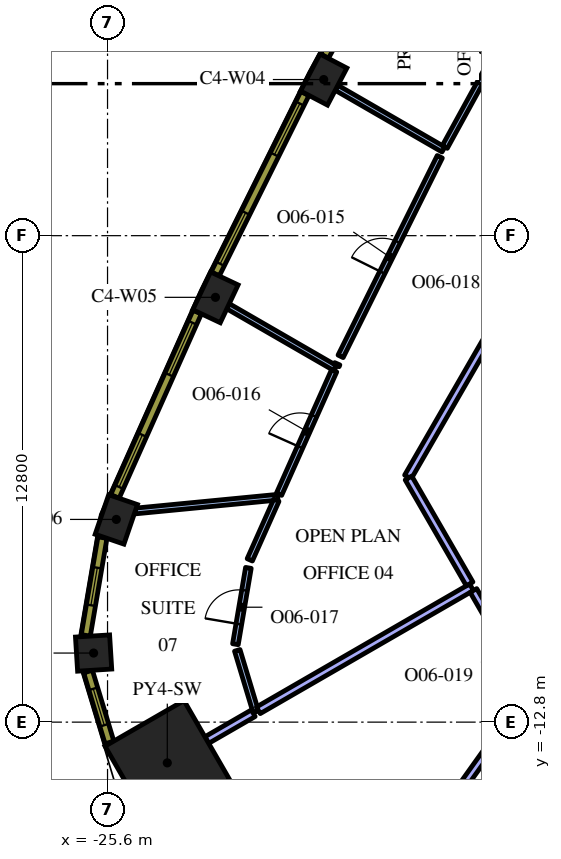
"""IFC4 building model, lengths in metres.
Left out: names, types, materials, properties, quantities, classifications, styles, units other than length and angle.
Written with IfcOpenShell. Run it as: python <this file> out.ifc"""

import sys

from ifc_helpers import new_model, si_unit, direction, frame, frame_2d, origin, origin_2d, place, context, subcontext, project, spatial, rectangle, extrude, element, fill, save


model = new_model("IFC4")
c1 = context("Model", 3, precision=1e-05, world=origin(), true_north=direction((0.0, 1.0)))
c2 = subcontext(c1, "Body", "Model", "MODEL_VIEW")
j1 = project(units=[si_unit("LENGTHUNIT", "METRE"), si_unit("PLANEANGLEUNIT", "RADIAN")], contexts=[c1])
p1 = place(None, origin())
s1 = spatial("IfcSite", under=j1, at=p1, CompositionType="ELEMENT")
p2 = place(p1, origin())
s2 = spatial("IfcBuilding", under=s1, at=p2, CompositionType="ELEMENT")
p3 = place(p2, frame((0.0, 0.0, 210.0)))
s3 = spatial("IfcBuildingStorey", under=s2, at=p3, CompositionType="ELEMENT", Elevation=210.0)
p4 = place(p3, frame((-24.027, -13.872, 0.0), z_axis=(0.0, 0.0, 1.0), x_axis=(-0.866025403784, -0.5, 0.0)))
e1 = element("IfcColumn", 1, at=p4, inside=s3, PredefinedType="COLUMN", context=c2, shape_type="SweptSolid", body=[
    extrude(rectangle(XDim=2.4, YDim=2.4, at=origin_2d()), origin(), (0.0, 0.0, 1.0), 4.2),
])
for number, where, z_axis, x_axis in (
    (2, (-19.912, 4.108, 0.0), (0.0, 0.0, 1.0), (-0.464, -0.886, 0.0)),
    (3, (-22.76, -1.623, 0.0), (0.0, 0.0, 1.0), (-0.426, -0.905, 0.0)),
    (4, (-25.369, -7.466, 0.0), (0.0, 0.0, 1.0), (-0.324, -0.946, 0.0)),
):
    element("IfcColumn", number, at=place(p3, frame(where, z_axis=z_axis, x_axis=x_axis)), inside=s3, PredefinedType="COLUMN", context=c2, shape_type="SweptSolid", body=[
        extrude(rectangle(XDim=1.1, YDim=0.8, at=origin_2d()), origin(), (0.0, 0.0, 1.0), 4.2),
    ])
p5 = place(p3, frame((-25.967, -10.982, 0.0), z_axis=(0.0, 0.0, 1.0), x_axis=(0.062217428964, -0.998062619044, 0.0)))
e5 = element("IfcColumn", 5, at=p5, inside=s3, PredefinedType="COLUMN", context=c2, shape_type="SweptSolid", body=[
    extrude(rectangle(XDim=0.9, YDim=0.9, at=origin_2d()), origin(), (0.0, 0.0, 1.0), 4.2),
])
p6 = place(p3, frame((-18.709, -17.916, 0.0), z_axis=(0.0, 0.0, 1.0), x_axis=(0.581023578026, 0.813886725397, 0.0)))
e6 = element("IfcWall", 6, at=p6, inside=s3, PredefinedType="PARTITIONING", context=c2, shape_type="SweptSolid", body=[
    extrude(rectangle(XDim=7.318, YDim=0.2, at=frame_2d((3.659, 0.0))), origin(), (0.0, 0.0, 1.0), 3.45),
])
p7 = place(p3, frame((-16.761, 2.268, 0.0), z_axis=(0.0, 0.0, 1.0), x_axis=(-0.866022812202, 0.500004488726, 0.0)))
e7 = element("IfcWall", 7, at=p7, inside=s3, PredefinedType="PARTITIONING", context=c2, shape_type="SweptSolid", body=[
    extrude(rectangle(XDim=3.247, YDim=0.15, at=frame_2d((1.624, 0.0))), origin(), (0.0, 0.0, 1.0), 3.45),
])
p8 = place(p3, frame((-16.725, 2.333, 0.0), z_axis=(0.0, 0.0, 1.0), x_axis=(0.480955103875, 0.876745224142, 0.0)))
e8 = element("IfcWall", 8, at=p8, inside=s3, PredefinedType="PARTITIONING", context=c2, shape_type="SweptSolid", body=[
    extrude(rectangle(XDim=6.129, YDim=0.15, at=frame_2d((3.064, 0.0))), origin(), (0.0, 0.0, 1.0), 3.45),
])
p9 = place(p8, frame((2.629, 0.0, 0.0)))
e9 = element("IfcOpeningElement", 9, at=p9, cuts=e8, PredefinedType="OPENING", context=c2, shape_type="SweptSolid", body=[
    extrude(rectangle(XDim=0.9, YDim=2.1, at=frame_2d((0.45, 1.05))), frame((0.0, 0.085, 0.0), z_axis=(0.0, -1.0, 0.0), x_axis=(1.0, 0.0, 0.0)), (0.0, 0.0, 1.0), 0.17),
])
p10 = place(p3, frame((-19.606, -3.487, 0.0), z_axis=(0.0, 0.0, 1.0), x_axis=(-0.866017179828, 0.50001424404, 0.0)))
e10 = element("IfcWall", 10, at=p10, inside=s3, PredefinedType="PARTITIONING", context=c2, shape_type="SweptSolid", body=[
    extrude(rectangle(XDim=3.259, YDim=0.15, at=frame_2d((1.63, 0.0))), origin(), (0.0, 0.0, 1.0), 3.45),
])
p11 = place(p3, frame((-19.467, -3.175, 0.0), z_axis=(0.0, 0.0, 1.0), x_axis=(0.445180755526, 0.895440726631, 0.0)))
e11 = element("IfcWall", 11, at=p11, inside=s3, PredefinedType="PARTITIONING", context=c2, shape_type="SweptSolid", body=[
    extrude(rectangle(XDim=5.864, YDim=0.15, at=frame_2d((2.932, 0.0))), origin(), (0.0, 0.0, 1.0), 3.45),
])
p12 = place(p11, frame((2.464, 0.0, 0.0)))
e12 = element("IfcOpeningElement", 12, at=p12, cuts=e11, PredefinedType="OPENING", context=c2, shape_type="SweptSolid", body=[
    extrude(rectangle(XDim=0.9, YDim=2.1, at=frame_2d((0.45, 1.05))), frame((0.0, 0.085, 0.0), z_axis=(0.0, -1.0, 0.0), x_axis=(1.0, 0.0, 0.0)), (0.0, 0.0, 1.0), 0.17),
])
p13 = place(p3, frame((-19.554, -3.371, 0.0), z_axis=(0.0, 0.0, 1.0), x_axis=(-0.408782924594, -0.912631645605, 0.0)))
e13 = element("IfcWall", 13, at=p13, inside=s3, PredefinedType="PARTITIONING", context=c2, shape_type="SweptSolid", body=[
    extrude(rectangle(XDim=0.051, YDim=0.15, at=frame_2d((0.026, 0.0))), origin(), (0.0, 0.0, 1.0), 3.45),
])
p14 = place(p3, frame((-21.122, -6.882, 0.0), z_axis=(0.0, 0.0, 1.0), x_axis=(-0.995354824533, -0.096274468471, 0.0)))
e14 = element("IfcWall", 14, at=p14, inside=s3, PredefinedType="PARTITIONING", context=c2, shape_type="SweptSolid", body=[
    extrude(rectangle(XDim=3.766, YDim=0.15, at=frame_2d((1.883, 0.0))), origin(), (0.0, 0.0, 1.0), 3.45),
])
p15 = place(p3, frame((-21.087, -6.803, 0.0), z_axis=(0.0, 0.0, 1.0), x_axis=(0.40757725445, 0.913170729741, 0.0)))
e15 = element("IfcWall", 15, at=p15, inside=s3, PredefinedType="PARTITIONING", context=c2, shape_type="SweptSolid", body=[
    extrude(rectangle(XDim=3.557, YDim=0.15, at=frame_2d((1.778, 0.0))), origin(), (0.0, 0.0, 1.0), 3.45),
])
p16 = place(p15, frame((1.357, 0.0, 0.0)))
e16 = element("IfcOpeningElement", 16, at=p16, cuts=e15, PredefinedType="OPENING", context=c2, shape_type="SweptSolid", body=[
    extrude(rectangle(XDim=0.9, YDim=2.1, at=frame_2d((0.45, 1.05))), frame((0.0, 0.085, 0.0), z_axis=(0.0, -1.0, 0.0), x_axis=(1.0, 0.0, 0.0)), (0.0, 0.0, 1.0), 0.17),
])
p17 = place(p3, frame((-21.157, -6.961, 0.0), z_axis=(0.0, 0.0, 1.0), x_axis=(-0.407627569492, -0.913148270869, 0.0)))
e17 = element("IfcWall", 17, at=p17, inside=s3, PredefinedType="PARTITIONING", context=c2, shape_type="SweptSolid", body=[
    extrude(rectangle(XDim=1.718, YDim=0.15, at=frame_2d((0.859, 0.0))), origin(), (0.0, 0.0, 1.0), 3.45),
])
p18 = place(p3, frame((-22.235, -10.75, 0.0), z_axis=(0.0, 0.0, 1.0), x_axis=(0.167623442148, 0.985851095066, 0.0)))
e18 = element("IfcWall", 18, at=p18, inside=s3, PredefinedType="PARTITIONING", context=c2, shape_type="SweptSolid", body=[
    extrude(rectangle(XDim=2.038, YDim=0.15, at=frame_2d((1.019, 0.0))), origin(), (0.0, 0.0, 1.0), 3.45),
])
p19 = place(p18, frame((0.538, 0.0, 0.0)))
e19 = element("IfcOpeningElement", 19, at=p19, cuts=e18, PredefinedType="OPENING", context=c2, shape_type="SweptSolid", body=[
    extrude(rectangle(XDim=0.9, YDim=2.1, at=frame_2d((0.45, 1.05))), frame((0.0, 0.085, 0.0), z_axis=(0.0, -1.0, 0.0), x_axis=(1.0, 0.0, 0.0)), (0.0, 0.0, 1.0), 0.17),
])
p20 = place(p3, frame((-22.186, -10.911, 0.0), z_axis=(0.0, 0.0, 1.0), x_axis=(0.288899576463, -0.957359407286, 0.0)))
e20 = element("IfcWall", 20, at=p20, inside=s3, PredefinedType="PARTITIONING", context=c2, shape_type="SweptSolid", body=[
    extrude(rectangle(XDim=1.688, YDim=0.15, at=frame_2d((0.844, 0.0))), origin(), (0.0, 0.0, 1.0), 3.45),
])
p21 = place(p3, frame((-21.765, -12.566, 0.0), z_axis=(0.0, 0.0, 1.0), x_axis=(-0.866021473228, -0.500006807861, 0.0)))
e21 = element("IfcWall", 21, at=p21, inside=s3, PredefinedType="PARTITIONING", context=c2, shape_type="SweptSolid", body=[
    extrude(rectangle(XDim=1.412, YDim=0.2, at=frame_2d((0.706, 0.0))), origin(), (0.0, 0.0, 1.0), 3.45),
])
p22 = place(p3, frame((-16.021, -9.25, 0.0), z_axis=(0.0, 0.0, 1.0), x_axis=(-0.86601739438, -0.500013872438, 0.0)))
e22 = element("IfcWall", 22, at=p22, inside=s3, PredefinedType="PARTITIONING", context=c2, shape_type="SweptSolid", body=[
    extrude(rectangle(XDim=6.478, YDim=0.2, at=frame_2d((3.239, 0.0))), origin(), (0.0, 0.0, 1.0), 3.45),
])
p23 = place(p3, frame((-12.787, 2.152, 0.0), z_axis=(0.0, 0.0, 1.0), x_axis=(-0.50000660679, -0.866021589319, 0.0)))
e23 = element("IfcWall", 23, at=p23, inside=s3, PredefinedType="PARTITIONING", context=c2, shape_type="SweptSolid", body=[
    extrude(rectangle(XDim=9.817, YDim=0.2, at=frame_2d((4.909, 0.0))), origin(), (0.0, 0.0, 1.0), 3.45),
])
p24 = place(p23, frame((4.4, 0.0, 0.0)))
e24 = element("IfcOpeningElement", 24, at=p24, cuts=e23, PredefinedType="OPENING", context=c2, shape_type="SweptSolid", body=[
    extrude(rectangle(XDim=1.0, YDim=2.1, at=frame_2d((0.5, 1.05))), frame((0.0, 0.11, 0.0), z_axis=(0.0, -1.0, 0.0), x_axis=(1.0, 0.0, 0.0)), (0.0, 0.0, 1.0), 0.22),
])
p25 = place(p3, frame((-17.681, -6.376, 0.0), z_axis=(0.0, 0.0, 1.0), x_axis=(0.500022299258, -0.866012528919, 0.0)))
e25 = element("IfcWall", 25, at=p25, inside=s3, PredefinedType="PARTITIONING", context=c2, shape_type="SweptSolid", body=[
    extrude(rectangle(XDim=3.219, YDim=0.2, at=frame_2d((1.609, 0.0))), origin(), (0.0, 0.0, 1.0), 3.45),
])
p26 = place(p3, frame((-15.971, -9.337, 0.0), z_axis=(0.0, 0.0, 1.0), x_axis=(0.500007233661, -0.866021227388, 0.0)))
e26 = element("IfcWall", 26, at=p26, inside=s3, PredefinedType="PARTITIONING", context=c2, shape_type="SweptSolid", body=[
    extrude(rectangle(XDim=2.919, YDim=0.2, at=frame_2d((1.459, 0.0))), origin(), (0.0, 0.0, 1.0), 3.45),
])
p27 = place(p26, frame((1.0, 0.0, 0.0)))
e27 = element("IfcOpeningElement", 27, at=p27, cuts=e26, PredefinedType="OPENING", context=c2, shape_type="SweptSolid", body=[
    extrude(rectangle(XDim=1.0, YDim=2.1, at=frame_2d((0.5, 1.05))), frame((0.0, 0.11, 0.0), z_axis=(0.0, -1.0, 0.0), x_axis=(1.0, 0.0, 0.0)), (0.0, 0.0, 1.0), 0.22),
])
p28 = place(p3, frame((-17.338, 9.368, 0.0), z_axis=(0.0, 0.0, 1.0), x_axis=(-0.481925825015, -0.876212017256, 0.0)))
e28 = element("IfcWall", 28, at=p28, inside=s3, PredefinedType="SOLIDWALL", context=c2, shape_type="SweptSolid", body=[
    extrude(rectangle(XDim=5.299, YDim=0.24, at=frame_2d((2.649, 0.0))), origin(), (0.0, 0.0, 1.0), 3.95),
])
p29 = place(p28, frame((0.295, 0.0, 0.9)))
e29 = element("IfcOpeningElement", 29, at=p29, cuts=e28, PredefinedType="OPENING", context=c2, shape_type="SweptSolid", body=[
    extrude(rectangle(XDim=1.5, YDim=2.55, at=frame_2d((0.75, 1.275))), frame((0.0, 0.13, 0.0), z_axis=(0.0, -1.0, 0.0), x_axis=(1.0, 0.0, 0.0)), (0.0, 0.0, 1.0), 0.26),
])
p30 = place(p28, frame((3.504, 0.0, 0.9)))
e30 = element("IfcOpeningElement", 30, at=p30, cuts=e28, PredefinedType="OPENING", context=c2, shape_type="SweptSolid", body=[
    extrude(rectangle(XDim=1.5, YDim=2.55, at=frame_2d((0.75, 1.275))), frame((0.0, 0.13, 0.0), z_axis=(0.0, -1.0, 0.0), x_axis=(1.0, 0.0, 0.0)), (0.0, 0.0, 1.0), 0.26),
])
p31 = place(p3, frame((-20.407, 3.74, 0.0), z_axis=(0.0, 0.0, 1.0), x_axis=(-0.445129582031, -0.895466166419, 0.0)))
e31 = element("IfcWall", 31, at=p31, inside=s3, PredefinedType="SOLIDWALL", context=c2, shape_type="SweptSolid", body=[
    extrude(rectangle(XDim=5.298, YDim=0.24, at=frame_2d((2.649, 0.0))), origin(), (0.0, 0.0, 1.0), 3.95),
])
p32 = place(p31, frame((0.295, 0.0, 0.9)))
e32 = element("IfcOpeningElement", 32, at=p32, cuts=e31, PredefinedType="OPENING", context=c2, shape_type="SweptSolid", body=[
    extrude(rectangle(XDim=1.5, YDim=2.55, at=frame_2d((0.75, 1.275))), frame((0.0, 0.13, 0.0), z_axis=(0.0, -1.0, 0.0), x_axis=(1.0, 0.0, 0.0)), (0.0, 0.0, 1.0), 0.26),
])
p33 = place(p31, frame((3.504, 0.0, 0.9)))
e33 = element("IfcOpeningElement", 33, at=p33, cuts=e31, PredefinedType="OPENING", context=c2, shape_type="SweptSolid", body=[
    extrude(rectangle(XDim=1.5, YDim=2.55, at=frame_2d((0.75, 1.275))), frame((0.0, 0.13, 0.0), z_axis=(0.0, -1.0, 0.0), x_axis=(1.0, 0.0, 0.0)), (0.0, 0.0, 1.0), 0.26),
])
p34 = place(p3, frame((-23.24, -2.011, 0.0), z_axis=(0.0, 0.0, 1.0), x_axis=(-0.407579651789, -0.913169659728, 0.0)))
e34 = element("IfcWall", 34, at=p34, inside=s3, PredefinedType="SOLIDWALL", context=c2, shape_type="SweptSolid", body=[
    extrude(rectangle(XDim=5.311, YDim=0.24, at=frame_2d((2.655, 0.0))), origin(), (0.0, 0.0, 1.0), 3.95),
])
p35 = place(p34, frame((0.306, 0.0, 0.9)))
e35 = element("IfcOpeningElement", 35, at=p35, cuts=e34, PredefinedType="OPENING", context=c2, shape_type="SweptSolid", body=[
    extrude(rectangle(XDim=1.5, YDim=2.55, at=frame_2d((0.75, 1.275))), frame((0.0, 0.13, 0.0), z_axis=(0.0, -1.0, 0.0), x_axis=(1.0, 0.0, 0.0)), (0.0, 0.0, 1.0), 0.26),
])
p36 = place(p34, frame((3.539, 0.0, 0.9)))
e36 = element("IfcOpeningElement", 36, at=p36, cuts=e34, PredefinedType="OPENING", context=c2, shape_type="SweptSolid", body=[
    extrude(rectangle(XDim=1.5, YDim=2.55, at=frame_2d((0.75, 1.275))), frame((0.0, 0.13, 0.0), z_axis=(0.0, -1.0, 0.0), x_axis=(1.0, 0.0, 0.0)), (0.0, 0.0, 1.0), 0.26),
])
p37 = place(p3, frame((-25.734, -7.945, 0.0), z_axis=(0.0, 0.0, 1.0), x_axis=(-0.167660055546, -0.985844869021, 0.0)))
e37 = element("IfcWall", 37, at=p37, inside=s3, PredefinedType="SOLIDWALL", context=c2, shape_type="SweptSolid", body=[
    extrude(rectangle(XDim=2.609, YDim=0.24, at=frame_2d((1.305, 0.0))), origin(), (0.0, 0.0, 1.0), 3.95),
])
p38 = place(p37, frame((0.805, 0.0, 0.9)))
e38 = element("IfcOpeningElement", 38, at=p38, cuts=e37, PredefinedType="OPENING", context=c2, shape_type="SweptSolid", body=[
    extrude(rectangle(XDim=1.0, YDim=2.55, at=frame_2d((0.5, 1.275))), frame((0.0, 0.13, 0.0), z_axis=(0.0, -1.0, 0.0), x_axis=(1.0, 0.0, 0.0)), (0.0, 0.0, 1.0), 0.26),
])
p39 = place(p3, frame((-26.112, -11.469, 0.0), z_axis=(0.0, 0.0, 1.0), x_axis=(0.288727209095, -0.957411405159, 0.0)))
e39 = element("IfcWall", 39, at=p39, inside=s3, PredefinedType="SOLIDWALL", context=c2, shape_type="SweptSolid", body=[
    extrude(rectangle(XDim=1.948, YDim=0.24, at=frame_2d((0.974, 0.0))), origin(), (0.0, 0.0, 1.0), 3.95),
])
p40 = place(p39, frame((0.474, 0.0, 0.9)))
e40 = element("IfcOpeningElement", 40, at=p40, cuts=e39, PredefinedType="OPENING", context=c2, shape_type="SweptSolid", body=[
    extrude(rectangle(XDim=1.0, YDim=2.55, at=frame_2d((0.5, 1.275))), frame((0.0, 0.13, 0.0), z_axis=(0.0, -1.0, 0.0), x_axis=(1.0, 0.0, 0.0)), (0.0, 0.0, 1.0), 0.26),
])
p41 = place(p12, origin())
e41 = element("IfcDoor", 41, at=p41, inside=s3, OperationType="SINGLE_SWING_LEFT", PredefinedType="DOOR", context=c2, shape_type="SweptSolid", body=[
    extrude(rectangle(XDim=0.9, YDim=2.1, at=frame_2d((0.45, 1.05))), frame((0.0, 0.025, 0.0), z_axis=(0.0, -1.0, 0.0), x_axis=(1.0, 0.0, 0.0)), (0.0, 0.0, 1.0), 0.05),
])
fill(e12, e41)
p42 = place(p16, origin())
e42 = element("IfcDoor", 42, at=p42, inside=s3, OperationType="SINGLE_SWING_RIGHT", PredefinedType="DOOR", context=c2, shape_type="SweptSolid", body=[
    extrude(rectangle(XDim=0.9, YDim=2.1, at=frame_2d((0.45, 1.05))), frame((0.0, 0.025, 0.0), z_axis=(0.0, -1.0, 0.0), x_axis=(1.0, 0.0, 0.0)), (0.0, 0.0, 1.0), 0.05),
])
fill(e16, e42)
p43 = place(p19, origin())
e43 = element("IfcDoor", 43, at=p43, inside=s3, OperationType="SINGLE_SWING_LEFT", PredefinedType="DOOR", context=c2, shape_type="SweptSolid", body=[
    extrude(rectangle(XDim=0.9, YDim=2.1, at=frame_2d((0.45, 1.05))), frame((0.0, 0.025, 0.0), z_axis=(0.0, -1.0, 0.0), x_axis=(1.0, 0.0, 0.0)), (0.0, 0.0, 1.0), 0.05),
])
fill(e19, e43)
p44 = place(p32, origin())
e44 = element("IfcWindow", 44, at=p44, inside=s3, PartitioningType="SINGLE_PANEL", PredefinedType="WINDOW", context=c2, shape_type="SweptSolid", body=[
    extrude(rectangle(XDim=1.5, YDim=2.55, at=frame_2d((0.75, 1.275))), frame((0.0, 0.04, 0.0), z_axis=(0.0, -1.0, 0.0), x_axis=(1.0, 0.0, 0.0)), (0.0, 0.0, 1.0), 0.06),
])
fill(e32, e44)
p45 = place(p33, origin())
e45 = element("IfcWindow", 45, at=p45, inside=s3, PartitioningType="SINGLE_PANEL", PredefinedType="WINDOW", context=c2, shape_type="SweptSolid", body=[
    extrude(rectangle(XDim=1.5, YDim=2.55, at=frame_2d((0.75, 1.275))), frame((0.0, 0.04, 0.0), z_axis=(0.0, -1.0, 0.0), x_axis=(1.0, 0.0, 0.0)), (0.0, 0.0, 1.0), 0.06),
])
fill(e33, e45)
p46 = place(p35, origin())
e46 = element("IfcWindow", 46, at=p46, inside=s3, PartitioningType="SINGLE_PANEL", PredefinedType="WINDOW", context=c2, shape_type="SweptSolid", body=[
    extrude(rectangle(XDim=1.5, YDim=2.55, at=frame_2d((0.75, 1.275))), frame((0.0, 0.04, 0.0), z_axis=(0.0, -1.0, 0.0), x_axis=(1.0, 0.0, 0.0)), (0.0, 0.0, 1.0), 0.06),
])
fill(e35, e46)
p47 = place(p36, origin())
e47 = element("IfcWindow", 47, at=p47, inside=s3, PartitioningType="SINGLE_PANEL", PredefinedType="WINDOW", context=c2, shape_type="SweptSolid", body=[
    extrude(rectangle(XDim=1.5, YDim=2.55, at=frame_2d((0.75, 1.275))), frame((0.0, 0.04, 0.0), z_axis=(0.0, -1.0, 0.0), x_axis=(1.0, 0.0, 0.0)), (0.0, 0.0, 1.0), 0.06),
])
fill(e36, e47)
p48 = place(p38, origin())
e48 = element("IfcWindow", 48, at=p48, inside=s3, PartitioningType="SINGLE_PANEL", PredefinedType="WINDOW", context=c2, shape_type="SweptSolid", body=[
    extrude(rectangle(XDim=1.0, YDim=2.55, at=frame_2d((0.5, 1.275))), frame((0.0, 0.04, 0.0), z_axis=(0.0, -1.0, 0.0), x_axis=(1.0, 0.0, 0.0)), (0.0, 0.0, 1.0), 0.06),
])
fill(e38, e48)
p49 = place(p40, origin())
e49 = element("IfcWindow", 49, at=p49, inside=s3, PartitioningType="SINGLE_PANEL", PredefinedType="WINDOW", context=c2, shape_type="SweptSolid", body=[
    extrude(rectangle(XDim=1.0, YDim=2.55, at=frame_2d((0.5, 1.275))), frame((0.0, 0.04, 0.0), z_axis=(0.0, -1.0, 0.0), x_axis=(1.0, 0.0, 0.0)), (0.0, 0.0, 1.0), 0.06),
])
fill(e40, e49)
save(model, sys.argv[1])
